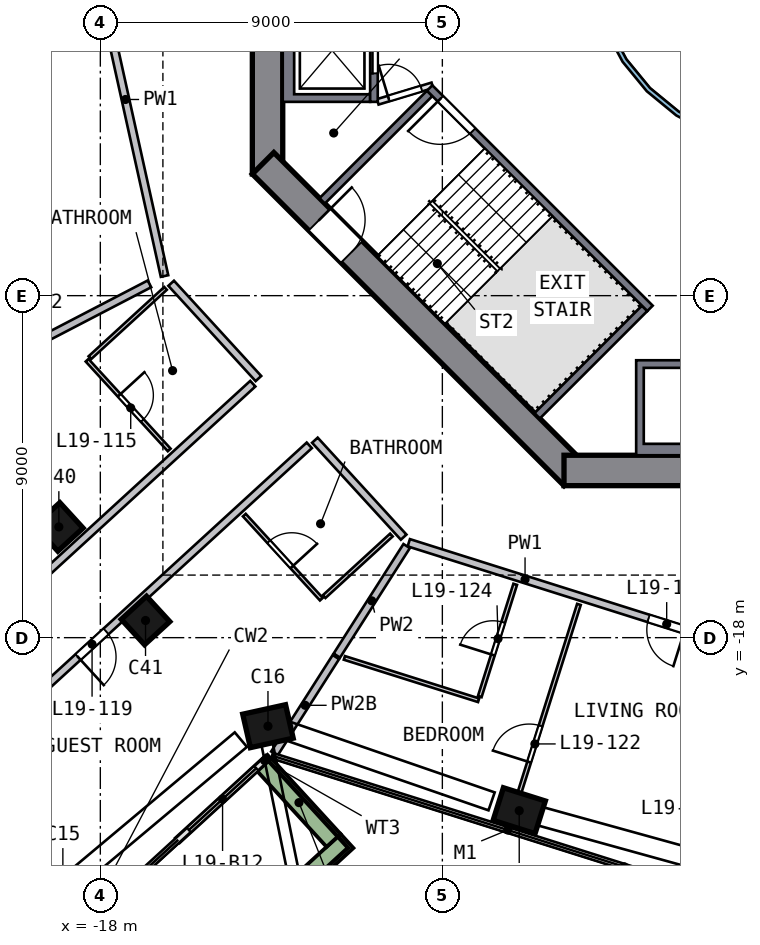
"""IFC4 building model, lengths in metres.
Left out: names, types, materials, properties, quantities, classifications, styles, units other than length and angle.
Written with IfcOpenShell. Run it as: python <this file> out.ifc"""

import sys

from ifc_helpers import new_model, si_unit, direction, frame, frame_2d, origin, origin_2d, place, context, subcontext, project, spatial, polyline, rectangle, outline, extrude, element, fill, save


model = new_model("IFC4")
c1 = context("Model", 3, precision=1e-05, world=origin(), true_north=direction((0.0, 1.0)))
c2 = subcontext(c1, "Body", "Model", "MODEL_VIEW")
j1 = project(units=[si_unit("LENGTHUNIT", "METRE"), si_unit("PLANEANGLEUNIT", "RADIAN")], contexts=[c1])
p1 = place(None, origin())
s1 = spatial("IfcSite", under=j1, at=p1, CompositionType="ELEMENT")
p2 = place(p1, origin())
s2 = spatial("IfcBuilding", under=s1, at=p2, CompositionType="ELEMENT")
p3 = place(p2, frame((0.0, 0.0, 86.0)))
s3 = spatial("IfcBuildingStorey", under=s2, at=p3, CompositionType="ELEMENT", Elevation=86.0)
p4 = place(p3, frame((-13.706, -20.252, 0.0), z_axis=(0.096843399, -0.064384897, 0.993214952), x_axis=(-0.971758684, -0.221869182, 0.080368695)))
e1 = element("IfcColumn", 1, at=p4, inside=s3, PredefinedType="COLUMN", context=c2, shape_type="SweptSolid", body=[
    extrude(rectangle(XDim=1.15, YDim=0.9, at=origin_2d()), origin(), (0.0, 0.0, 1.0), 3.212),
])
p5 = place(p3, frame((-7.107, -22.513, 0.0), z_axis=(0.107382919, -0.032929748, 0.99367225), x_axis=(0.947501295, -0.299377243, -0.11231457)))
e2 = element("IfcColumn", 2, at=p5, inside=s3, PredefinedType="COLUMN", context=c2, shape_type="SweptSolid", body=[
    extrude(rectangle(XDim=1.15, YDim=0.9, at=origin_2d()), origin(), (0.0, 0.0, 1.0), 3.21),
])
for number, where, z_axis, x_axis in (
    (3, (-19.178, -14.976, 0.0), (0.072, -0.091, 0.993), (-0.738, -0.674, -0.008)),
    (4, (-16.912, -17.452, 0.0), (0.084, -0.08, 0.993), (-0.737, -0.676, 0.008)),
):
    element("IfcColumn", number, at=place(p3, frame(where, z_axis=z_axis, x_axis=x_axis)), inside=s3, PredefinedType="COLUMN", context=c2, shape_type="SweptSolid", body=[
        extrude(rectangle(XDim=0.9, YDim=0.9, at=origin_2d()), origin(), (0.0, 0.0, 1.0), 3.211),
    ])
p6 = place(p3, frame((-13.6, 5.799, 0.0), z_axis=(0.0, 0.0, 1.0), x_axis=(0.0, -1.0, 0.0)))
e5 = element("IfcWall", 5, at=p6, inside=s3, PredefinedType="SHEAR", context=c2, shape_type="SweptSolid", body=[
    extrude(rectangle(XDim=11.598, YDim=0.8, at=frame_2d((5.799, 0.0))), origin(), (0.0, 0.0, 1.0), 3.5),
])
p7 = place(p6, frame((4.899, 0.0, 0.0)))
e6 = element("IfcOpeningElement", 6, at=p7, cuts=e5, PredefinedType="OPENING", context=c2, shape_type="SweptSolid", body=[
    extrude(rectangle(XDim=1.8, YDim=2.1, at=frame_2d((0.9, 1.05))), frame((0.0, 0.41, 0.0), z_axis=(0.0, -1.0, 0.0), x_axis=(1.0, 0.0, 0.0)), (0.0, 0.0, 1.0), 0.82),
])
p8 = place(p3, frame((-13.717, -5.516, 0.0), z_axis=(0.0, 0.0, 1.0), x_axis=(0.707106781, -0.707106781, 0.0)))
e7 = element("IfcWall", 7, at=p8, inside=s3, PredefinedType="SHEAR", context=c2, shape_type="SweptSolid", body=[
    extrude(rectangle(XDim=11.598, YDim=0.8, at=frame_2d((5.799, 0.0))), origin(), (0.0, 0.0, 1.0), 3.5),
])
p9 = place(p8, frame((2.099, 0.0, 0.0)))
e8 = element("IfcOpeningElement", 8, at=p9, cuts=e7, PredefinedType="OPENING", context=c2, shape_type="SweptSolid", body=[
    extrude(rectangle(XDim=1.2, YDim=2.1, at=frame_2d((0.6, 1.05))), frame((0.0, 0.41, 0.0), z_axis=(0.0, -1.0, 0.0), x_axis=(1.0, 0.0, 0.0)), (0.0, 0.0, 1.0), 0.82),
])
p10 = place(p3, frame((-5.799, -13.6, 0.0), z_axis=(0.0, 0.0, 1.0), x_axis=(1.0, 0.0, 0.0)))
e9 = element("IfcWall", 9, at=p10, inside=s3, PredefinedType="SHEAR", context=c2, shape_type="SweptSolid", body=[
    extrude(rectangle(XDim=11.598, YDim=0.8, at=frame_2d((5.799, 0.0))), origin(), (0.0, 0.0, 1.0), 3.5),
])
p11 = place(p10, frame((4.899, 0.0, 0.0)))
e10 = element("IfcOpeningElement", 10, at=p11, cuts=e9, PredefinedType="OPENING", context=c2, shape_type="SweptSolid", body=[
    extrude(rectangle(XDim=1.8, YDim=2.1, at=frame_2d((0.9, 1.05))), frame((0.0, 0.41, 0.0), z_axis=(0.0, -1.0, 0.0), x_axis=(1.0, 0.0, 0.0)), (0.0, 0.0, 1.0), 0.82),
])
p12 = place(p3, frame((-15.963, -23.329, 0.0), z_axis=(0.0, 0.0, 1.0), x_axis=(0.73747709, 0.67537215, 0.0)))
e11 = element("IfcWall", 11, at=p12, inside=s3, PredefinedType="SOLIDWALL", context=c2, shape_type="SweptSolid", body=[
    extrude(rectangle(XDim=3.2, YDim=0.15, at=frame_2d((1.6, 0.0))), origin(), (0.0, 0.0, 1.0), 2.425),
])
p13 = place(p12, frame((0.4, 0.0, 0.0)))
e12 = element("IfcOpeningElement", 12, at=p13, cuts=e11, PredefinedType="OPENING", context=c2, shape_type="SweptSolid", body=[
    extrude(rectangle(XDim=2.4, YDim=2.4, at=frame_2d((1.2, 1.2))), frame((0.0, 0.085, 0.0), z_axis=(0.0, -1.0, 0.0), x_axis=(1.0, 0.0, 0.0)), (0.0, 0.0, 1.0), 0.17),
])
p14 = place(p3, frame((-21.014, -32.056, 0.0), z_axis=(0.0, 0.0, 1.0), x_axis=(0.737507871, 0.675338537, 0.0)))
e13 = element("IfcWall", 13, at=p14, inside=s3, PredefinedType="SOLIDWALL", context=c2, shape_type="SweptSolid", body=[
    extrude(rectangle(XDim=12.888, YDim=0.5, at=frame_2d((6.444, 0.0))), origin(), (0.0, 0.0, 1.0), 0.7),
])
p15 = place(p3, frame((-11.862, -23.336, 0.0), z_axis=(0.0, 0.0, 1.0), x_axis=(-0.675351791, 0.737495734, 0.0)))
e14 = element("IfcWall", 14, at=p15, inside=s3, PredefinedType="SOLIDWALL", context=c2, shape_type="SweptSolid", body=[
    extrude(rectangle(XDim=2.699, YDim=0.5, at=frame_2d((1.35, 0.0))), origin(), (0.0, 0.0, 1.0), 0.7),
])
p16 = place(p3, origin())
e15 = element("IfcWall", 15, at=p16, inside=s3, PredefinedType="SOLIDWALL", context=c2, shape_type="SweptSolid", body=[
    extrude(outline(polyline([(-13.2, -3.9), (-13.2, -1.2), (-10.9, -1.2), (-10.9, -1.4), (-12.9, -1.4), (-12.9, -3.7), (-10.9, -3.7), (-10.9, -3.9), (-13.2, -3.9)])), origin(), (0.0, 0.0, 1.0), 3.19),
])
p17 = place(p3, frame((-10.8, -1.2, 0.0), z_axis=(0.0, 0.0, 1.0), x_axis=(0.0, -1.0, 0.0)))
e16 = element("IfcWall", 16, at=p17, inside=s3, PredefinedType="SOLIDWALL", context=c2, shape_type="SweptSolid", body=[
    extrude(rectangle(XDim=2.7, YDim=0.2, at=frame_2d((1.35, 0.0))), origin(), (0.0, 0.0, 1.0), 3.19),
])
p18 = place(p17, frame((0.75, 0.0, 0.0)))
e17 = element("IfcOpeningElement", 17, at=p18, cuts=e16, PredefinedType="OPENING", context=c2, shape_type="SweptSolid", body=[
    extrude(rectangle(XDim=1.2, YDim=2.1, at=frame_2d((0.6, 1.05))), frame((0.0, 0.11, 0.0), z_axis=(0.0, -1.0, 0.0), x_axis=(1.0, 0.0, 0.0)), (0.0, 0.0, 1.0), 0.22),
])
p19 = place(p3, origin())
e18 = element("IfcWall", 18, at=p19, inside=s3, PredefinedType="SOLIDWALL", context=c2, shape_type="SweptSolid", body=[
    extrude(outline(polyline([(-1.2, -13.2), (-3.9, -13.2), (-3.9, -10.7), (-1.2, -10.7), (-1.2, -13.2)]), holes=[polyline([(-3.7, -10.9), (-3.7, -12.9), (-1.4, -12.9), (-1.4, -10.9), (-3.7, -10.9)])]), origin(), (0.0, 0.0, 1.0), 3.19),
])
p20 = place(p3, frame((-3.535, -9.334, 0.0), z_axis=(0.0, 0.0, 1.0), x_axis=(-0.707106781, 0.707106781, 0.0)))
e19 = element("IfcWall", 19, at=p20, inside=s3, PredefinedType="SOLIDWALL", context=c2, shape_type="SweptSolid", body=[
    extrude(rectangle(XDim=8.2, YDim=0.2, at=frame_2d((4.1, 0.0))), origin(), (0.0, 0.0, 1.0), 3.19),
])
p21 = place(p20, frame((6.6, 0.0, 0.0)))
e20 = element("IfcOpeningElement", 20, at=p21, cuts=e19, PredefinedType="OPENING", context=c2, shape_type="SweptSolid", body=[
    extrude(rectangle(XDim=1.2, YDim=2.1, at=frame_2d((0.6, 1.05))), frame((0.0, 0.11, 0.0), z_axis=(0.0, -1.0, 0.0), x_axis=(1.0, 0.0, 0.0)), (0.0, 0.0, 1.0), 0.22),
])
for number, where, z_axis, x_axis in (
    (21, (-9.334, -3.677, 0.0), (0.0, 0.0, 1.0), (-0.707, -0.707, 0.0)),
    (22, (-3.677, -9.334, 0.0), (0.0, 0.0, 1.0), (-0.707, -0.707, 0.0)),
):
    element("IfcWall", number, at=place(p3, frame(where, z_axis=z_axis, x_axis=x_axis)), inside=s3, PredefinedType="SOLIDWALL", context=c2, shape_type="SweptSolid", body=[
        extrude(rectangle(XDim=4.0, YDim=0.2, at=frame_2d((2.0, 0.0))), origin(), (0.0, 0.0, 1.0), 3.19),
    ])
p22 = place(p3, frame((-10.7, -3.9, 0.0), z_axis=(0.0, 0.0, 1.0), x_axis=(0.957084567, 0.289808785, 0.0)))
e23 = element("IfcWall", 23, at=p22, inside=s3, PredefinedType="PARTITIONING", context=c2, shape_type="SweptSolid", body=[
    extrude(rectangle(XDim=1.501, YDim=0.15, at=frame_2d((0.75, 0.0))), origin(), (0.0, 0.0, 1.0), 3.19),
])
p23 = place(p22, frame((0.301, 0.0, 0.0)))
e24 = element("IfcOpeningElement", 24, at=p23, cuts=e23, PredefinedType="OPENING", context=c2, shape_type="SweptSolid", body=[
    extrude(rectangle(XDim=0.9, YDim=2.1, at=frame_2d((0.45, 1.05))), frame((0.0, 0.085, 0.0), z_axis=(0.0, -1.0, 0.0), x_axis=(1.0, 0.0, 0.0)), (0.0, 0.0, 1.0), 0.17),
])
p24 = place(p3, origin())
e25 = element("IfcWall", 25, at=p24, inside=s3, PredefinedType="SOLIDWALL", context=c2, shape_type="SweptSolid", body=[
    extrude(outline(polyline([(5.021, -0.999), (4.73, -1.959), (4.257, -2.844), (3.62, -3.62), (2.844, -4.257), (1.959, -4.73), (0.999, -5.021), (0.0, -5.12), (-0.999, -5.021), (-1.959, -4.73), (-2.844, -4.257), (-3.62, -3.62), (-4.257, -2.844), (-4.73, -1.959), (-5.021, -0.999), (-5.12, 0.0), (-5.021, 0.999), (-4.73, 1.959), (-4.257, 2.844), (-3.62, 3.62), (-2.844, 4.257), (-1.959, 4.73), (-0.999, 5.021), (0.0, 5.12), (0.999, 5.021), (1.959, 4.73), (2.844, 4.257), (3.62, 3.62), (4.257, 2.844), (4.73, 1.959), (5.021, 0.999), (5.12, 0.0), (5.021, -0.999)]), holes=[polyline([(4.904, 0.976), (4.619, 1.913), (4.157, 2.778), (3.535, 3.535), (2.778, 4.157), (1.913, 4.619), (0.976, 4.904), (0.0, 5.0), (-0.976, 4.904), (-1.913, 4.619), (-2.778, 4.157), (-3.535, 3.535), (-4.157, 2.778), (-4.619, 1.913), (-4.904, 0.976), (-5.0, 0.0), (-4.904, -0.976), (-4.619, -1.913), (-4.157, -2.778), (-3.535, -3.535), (-2.778, -4.157), (-1.913, -4.619), (-0.976, -4.904), (0.0, -5.0), (0.976, -4.904), (1.913, -4.619), (2.778, -4.157), (3.535, -3.535), (4.157, -2.778), (4.619, -1.913), (4.904, -0.976), (5.0, 0.0), (4.904, 0.976)])]), origin(), (0.0, 0.0, 1.0), 3.19),
])
p25 = place(p3, frame((-28.508, -24.613, 0.0), z_axis=(0.0, 0.0, 1.0), x_axis=(0.737515881, 0.67532979, 0.0)))
e26 = element("IfcWall", 26, at=p25, inside=s3, PredefinedType="SOLIDWALL", context=c2, shape_type="SweptSolid", body=[
    extrude(rectangle(XDim=19.689, YDim=0.2, at=frame_2d((9.844, 0.0))), origin(), (0.0, 0.0, 1.0), 3.19),
])
p26 = place(p25, frame((2.85, 0.0, 0.0)))
e27 = element("IfcOpeningElement", 27, at=p26, cuts=e26, PredefinedType="OPENING", context=c2, shape_type="SweptSolid", body=[
    extrude(rectangle(XDim=1.0, YDim=2.1, at=frame_2d((0.5, 1.05))), frame((0.0, 0.11, 0.0), z_axis=(0.0, -1.0, 0.0), x_axis=(1.0, 0.0, 0.0)), (0.0, 0.0, 1.0), 0.22),
])
p27 = place(p3, frame((-12.502, -12.939, 0.0), z_axis=(0.0, 0.0, 1.0), x_axis=(-0.737510226, -0.675335966, 0.0)))
e28 = element("IfcWall", 28, at=p27, inside=s3, PredefinedType="SOLIDWALL", context=c2, shape_type="SweptSolid", body=[
    extrude(rectangle(XDim=19.688, YDim=0.2, at=frame_2d((9.844, 0.0))), origin(), (0.0, 0.0, 1.0), 3.19),
])
p28 = place(p27, frame((7.25, 0.0, 0.0)))
e29 = element("IfcOpeningElement", 29, at=p28, cuts=e28, PredefinedType="OPENING", context=c2, shape_type="SweptSolid", body=[
    extrude(rectangle(XDim=1.0, YDim=2.1, at=frame_2d((0.5, 1.05))), frame((0.0, 0.11, 0.0), z_axis=(0.0, -1.0, 0.0), x_axis=(1.0, 0.0, 0.0)), (0.0, 0.0, 1.0), 0.22),
])
p29 = place(p3, frame((-18.367, 0.808, 0.0), z_axis=(0.0, 0.0, 1.0), x_axis=(0.216096423, -0.976372027, 0.0)))
e30 = element("IfcWall", 30, at=p29, inside=s3, PredefinedType="SOLIDWALL", context=c2, shape_type="SweptSolid", body=[
    extrude(rectangle(XDim=9.516, YDim=0.2, at=frame_2d((4.758, 0.0))), origin(), (0.0, 0.0, 1.0), 3.19),
])
p30 = place(p3, frame((-16.136, -8.674, 0.0), z_axis=(0.0, 0.0, 1.0), x_axis=(0.675366857, -0.737481938, 0.0)))
e31 = element("IfcWall", 31, at=p30, inside=s3, PredefinedType="SOLIDWALL", context=c2, shape_type="SweptSolid", body=[
    extrude(rectangle(XDim=3.4, YDim=0.2, at=frame_2d((1.7, 0.0))), origin(), (0.0, 0.0, 1.0), 3.19),
])
p31 = place(p3, frame((-12.354, -12.804, 0.0), z_axis=(0.0, 0.0, 1.0), x_axis=(0.675324927, -0.737520334, 0.0)))
e32 = element("IfcWall", 32, at=p31, inside=s3, PredefinedType="SOLIDWALL", context=c2, shape_type="SweptSolid", body=[
    extrude(rectangle(XDim=3.458, YDim=0.2, at=frame_2d((1.729, 0.0))), origin(), (0.0, 0.0, 1.0), 3.19),
])
p32 = place(p3, frame((-0.808, -18.367, 0.0), z_axis=(0.0, 0.0, 1.0), x_axis=(-0.953616003, 0.301025777, 0.0)))
e33 = element("IfcWall", 33, at=p32, inside=s3, PredefinedType="SOLIDWALL", context=c2, shape_type="SweptSolid", body=[
    extrude(rectangle(XDim=9.517, YDim=0.2, at=frame_2d((4.758, 0.0))), origin(), (0.0, 0.0, 1.0), 3.19),
])
p33 = place(p32, frame((1.9, 0.0, 0.0)))
e34 = element("IfcOpeningElement", 34, at=p33, cuts=e33, PredefinedType="OPENING", context=c2, shape_type="SweptSolid", body=[
    extrude(rectangle(XDim=1.0, YDim=2.1, at=frame_2d((0.5, 1.05))), frame((0.0, 0.11, 0.0), z_axis=(0.0, -1.0, 0.0), x_axis=(1.0, 0.0, 0.0)), (0.0, 0.0, 1.0), 0.22),
])
p34 = place(p3, frame((-16.707, -8.69, 0.0), z_axis=(0.0, 0.0, 1.0), x_axis=(-0.887170515, -0.461441739, 0.0)))
e35 = element("IfcWall", 35, at=p34, inside=s3, PredefinedType="SOLIDWALL", context=c2, shape_type="SweptSolid", body=[
    extrude(rectangle(XDim=6.132, YDim=0.2, at=frame_2d((3.066, 0.0))), origin(), (0.0, 0.0, 1.0), 3.19),
])
p35 = place(p3, frame((-11.802, -18.51, 0.0), z_axis=(0.0, 0.0, 1.0), x_axis=(-0.537578234, -0.843213877, 0.0)))
e36 = element("IfcWall", 36, at=p35, inside=s3, PredefinedType="SOLIDWALL", context=c2, shape_type="SweptSolid", body=[
    extrude(rectangle(XDim=3.011, YDim=0.2, at=frame_2d((1.506, 0.0))), origin(), (0.0, 0.0, 1.0), 2.69),
])
p36 = place(p3, frame((-9.939, -15.589, 0.0), z_axis=(0.0, 0.0, 1.0), x_axis=(-0.537591617, -0.843205345, 0.0)))
e37 = element("IfcWall", 37, at=p36, inside=s3, PredefinedType="SOLIDWALL", context=c2, shape_type="SweptSolid", body=[
    extrude(rectangle(XDim=3.418, YDim=0.2, at=frame_2d((1.709, 0.0))), origin(), (0.0, 0.0, 1.0), 3.19),
])
p37 = place(p3, frame((-16.283, -8.809, 0.0), z_axis=(0.0, 0.0, 1.0), x_axis=(-0.737570623, -0.675270003, 0.0)))
e38 = element("IfcWall", 38, at=p37, inside=s3, PredefinedType="PARTITIONING", context=c2, shape_type="SweptSolid", body=[
    extrude(rectangle(XDim=2.7, YDim=0.1, at=frame_2d((1.35, 0.0))), origin(), (0.0, 0.0, 1.0), 3.19),
])
p38 = place(p3, frame((-18.348, -10.7, 0.0), z_axis=(0.0, 0.0, 1.0), x_axis=(0.67529265, -0.737549887, 0.0)))
e39 = element("IfcWall", 39, at=p38, inside=s3, PredefinedType="PARTITIONING", context=c2, shape_type="SweptSolid", body=[
    extrude(rectangle(XDim=3.2, YDim=0.1, at=frame_2d((1.6, 0.0))), origin(), (0.0, 0.0, 1.0), 3.19),
])
p39 = place(p38, frame((1.25, 0.0, 0.0)))
e40 = element("IfcOpeningElement", 40, at=p39, cuts=e39, PredefinedType="OPENING", context=c2, shape_type="SweptSolid", body=[
    extrude(rectangle(XDim=0.9, YDim=2.1, at=frame_2d((0.45, 1.05))), frame((0.0, 0.06, 0.0), z_axis=(0.0, -1.0, 0.0), x_axis=(1.0, 0.0, 0.0)), (0.0, 0.0, 1.0), 0.12),
])
p40 = place(p3, frame((-14.21, -14.775, 0.0), z_axis=(0.0, 0.0, 1.0), x_axis=(0.675337617, -0.737508714, 0.0)))
e41 = element("IfcWall", 41, at=p40, inside=s3, PredefinedType="PARTITIONING", context=c2, shape_type="SweptSolid", body=[
    extrude(rectangle(XDim=3.0, YDim=0.1, at=frame_2d((1.5, 0.0))), origin(), (0.0, 0.0, 1.0), 3.19),
])
p41 = place(p40, frame((0.95, 0.0, 0.0)))
e42 = element("IfcOpeningElement", 42, at=p41, cuts=e41, PredefinedType="OPENING", context=c2, shape_type="SweptSolid", body=[
    extrude(rectangle(XDim=0.9, YDim=2.1, at=frame_2d((0.45, 1.05))), frame((0.0, 0.06, 0.0), z_axis=(0.0, -1.0, 0.0), x_axis=(1.0, 0.0, 0.0)), (0.0, 0.0, 1.0), 0.12),
])
p42 = place(p3, frame((-10.341, -15.299, 0.0), z_axis=(0.0, 0.0, 1.0), x_axis=(-0.737550957, -0.675291483, 0.0)))
e43 = element("IfcWall", 43, at=p42, inside=s3, PredefinedType="PARTITIONING", context=c2, shape_type="SweptSolid", body=[
    extrude(rectangle(XDim=2.4, YDim=0.1, at=frame_2d((1.2, 0.0))), origin(), (0.0, 0.0, 1.0), 3.19),
])
p43 = place(p3, frame((-11.578, -18.532, 0.0), z_axis=(0.0, 0.0, 1.0), x_axis=(0.953617524, -0.301020959, 0.0)))
e44 = element("IfcWall", 44, at=p43, inside=s3, PredefinedType="PARTITIONING", context=c2, shape_type="SweptSolid", body=[
    extrude(rectangle(XDim=3.704, YDim=0.1, at=frame_2d((1.852, 0.0))), origin(), (0.0, 0.0, 1.0), 3.19),
])
p44 = place(p3, frame((-8.016, -19.552, 0.0), z_axis=(0.0, 0.0, 1.0), x_axis=(0.301018286, 0.953618368, 0.0)))
e45 = element("IfcWall", 45, at=p44, inside=s3, PredefinedType="PARTITIONING", context=c2, shape_type="SweptSolid", body=[
    extrude(rectangle(XDim=3.1, YDim=0.1, at=frame_2d((1.55, 0.0))), origin(), (0.0, 0.0, 1.0), 3.19),
])
p45 = place(p44, frame((1.15, 0.0, 0.0)))
e46 = element("IfcOpeningElement", 46, at=p45, cuts=e45, PredefinedType="OPENING", context=c2, shape_type="SweptSolid", body=[
    extrude(rectangle(XDim=0.9, YDim=2.1, at=frame_2d((0.45, 1.05))), frame((0.0, 0.06, 0.0), z_axis=(0.0, -1.0, 0.0), x_axis=(1.0, 0.0, 0.0)), (0.0, 0.0, 1.0), 0.12),
])
p46 = place(p3, frame((-7.258, -22.99, 0.0), z_axis=(0.0, 0.0, 1.0), x_axis=(0.301026872, 0.953615657, 0.0)))
e47 = element("IfcWall", 47, at=p46, inside=s3, PredefinedType="PARTITIONING", context=c2, shape_type="SweptSolid", body=[
    extrude(rectangle(XDim=6.15, YDim=0.1, at=frame_2d((3.075, 0.0))), origin(), (0.0, 0.0, 1.0), 3.19),
])
p47 = place(p46, frame((1.8, 0.0, 0.0)))
e48 = element("IfcOpeningElement", 48, at=p47, cuts=e47, PredefinedType="OPENING", context=c2, shape_type="SweptSolid", body=[
    extrude(rectangle(XDim=1.0, YDim=2.1, at=frame_2d((0.5, 1.05))), frame((0.0, 0.06, 0.0), z_axis=(0.0, -1.0, 0.0), x_axis=(1.0, 0.0, 0.0)), (0.0, 0.0, 1.0), 0.12),
])
p48 = place(p13, origin())
e49 = element("IfcDoor", 49, at=p48, inside=s3, OperationType="SLIDING_TO_RIGHT", PredefinedType="DOOR", context=c2, shape_type="SweptSolid", body=[
    extrude(rectangle(XDim=2.4, YDim=2.4, at=frame_2d((1.2, 1.2))), frame((0.0, 0.025, 0.0), z_axis=(0.0, -1.0, 0.0), x_axis=(1.0, 0.0, 0.0)), (0.0, 0.0, 1.0), 0.05),
])
fill(e12, e49)
p49 = place(p18, origin())
e50 = element("IfcDoor", 50, at=p49, inside=s3, OperationType="DOUBLE_DOOR_SLIDING", PredefinedType="DOOR", context=c2, shape_type="SweptSolid", body=[
    extrude(rectangle(XDim=1.2, YDim=2.1, at=frame_2d((0.6, 1.05))), frame((0.0, 0.025, 0.0), z_axis=(0.0, -1.0, 0.0), x_axis=(1.0, 0.0, 0.0)), (0.0, 0.0, 1.0), 0.05),
])
fill(e17, e50)
p50 = place(p21, origin())
e51 = element("IfcDoor", 51, at=p50, inside=s3, OperationType="SINGLE_SWING_RIGHT", PredefinedType="DOOR", context=c2, shape_type="SweptSolid", body=[
    extrude(rectangle(XDim=1.2, YDim=2.1, at=frame_2d((0.6, 1.05))), frame((0.0, 0.025, 0.0), z_axis=(0.0, -1.0, 0.0), x_axis=(1.0, 0.0, 0.0)), (0.0, 0.0, 1.0), 0.05),
])
fill(e20, e51)
p51 = place(p9, origin())
e52 = element("IfcDoor", 52, at=p51, inside=s3, OperationType="SINGLE_SWING_LEFT", PredefinedType="DOOR", context=c2, shape_type="SweptSolid", body=[
    extrude(rectangle(XDim=1.2, YDim=2.1, at=frame_2d((0.6, 1.05))), frame((0.0, 0.025, 0.0), z_axis=(0.0, -1.0, 0.0), x_axis=(1.0, 0.0, 0.0)), (0.0, 0.0, 1.0), 0.05),
])
fill(e8, e52)
p52 = place(p23, origin())
e53 = element("IfcDoor", 53, at=p52, inside=s3, OperationType="SINGLE_SWING_LEFT", PredefinedType="DOOR", context=c2, shape_type="SweptSolid", body=[
    extrude(rectangle(XDim=0.9, YDim=2.1, at=frame_2d((0.45, 1.05))), frame((0.0, 0.025, 0.0), z_axis=(0.0, -1.0, 0.0), x_axis=(1.0, 0.0, 0.0)), (0.0, 0.0, 1.0), 0.05),
])
fill(e24, e53)
p53 = place(p39, origin())
e54 = element("IfcDoor", 54, at=p53, inside=s3, OperationType="SINGLE_SWING_LEFT", PredefinedType="DOOR", context=c2, shape_type="SweptSolid", body=[
    extrude(rectangle(XDim=0.9, YDim=2.1, at=frame_2d((0.45, 1.05))), frame((0.0, 0.025, 0.0), z_axis=(0.0, -1.0, 0.0), x_axis=(1.0, 0.0, 0.0)), (0.0, 0.0, 1.0), 0.05),
])
fill(e40, e54)
p54 = place(p28, origin())
e55 = element("IfcDoor", 55, at=p54, inside=s3, OperationType="SINGLE_SWING_RIGHT", PredefinedType="DOOR", context=c2, shape_type="SweptSolid", body=[
    extrude(rectangle(XDim=1.0, YDim=2.1, at=frame_2d((0.5, 1.05))), frame((0.0, 0.025, 0.0), z_axis=(0.0, -1.0, 0.0), x_axis=(1.0, 0.0, 0.0)), (0.0, 0.0, 1.0), 0.05),
])
fill(e29, e55)
p55 = place(p41, origin())
e56 = element("IfcDoor", 56, at=p55, inside=s3, OperationType="SINGLE_SWING_RIGHT", PredefinedType="DOOR", context=c2, shape_type="SweptSolid", body=[
    extrude(rectangle(XDim=0.9, YDim=2.1, at=frame_2d((0.45, 1.05))), frame((0.0, 0.025, 0.0), z_axis=(0.0, -1.0, 0.0), x_axis=(1.0, 0.0, 0.0)), (0.0, 0.0, 1.0), 0.05),
])
fill(e42, e56)
p56 = place(p33, origin())
e57 = element("IfcDoor", 57, at=p56, inside=s3, OperationType="SINGLE_SWING_LEFT", PredefinedType="DOOR", context=c2, shape_type="SweptSolid", body=[
    extrude(rectangle(XDim=1.0, YDim=2.1, at=frame_2d((0.5, 1.05))), frame((0.0, 0.025, 0.0), z_axis=(0.0, -1.0, 0.0), x_axis=(1.0, 0.0, 0.0)), (0.0, 0.0, 1.0), 0.05),
])
fill(e34, e57)
p57 = place(p47, origin())
e58 = element("IfcDoor", 58, at=p57, inside=s3, OperationType="SINGLE_SWING_LEFT", PredefinedType="DOOR", context=c2, shape_type="SweptSolid", body=[
    extrude(rectangle(XDim=1.0, YDim=2.1, at=frame_2d((0.5, 1.05))), frame((0.0, 0.025, 0.0), z_axis=(0.0, -1.0, 0.0), x_axis=(1.0, 0.0, 0.0)), (0.0, 0.0, 1.0), 0.05),
])
fill(e48, e58)
p58 = place(p45, origin())
e59 = element("IfcDoor", 59, at=p58, inside=s3, OperationType="SINGLE_SWING_LEFT", PredefinedType="DOOR", context=c2, shape_type="SweptSolid", body=[
    extrude(rectangle(XDim=0.9, YDim=2.1, at=frame_2d((0.45, 1.05))), frame((0.0, 0.025, 0.0), z_axis=(0.0, -1.0, 0.0), x_axis=(1.0, 0.0, 0.0)), (0.0, 0.0, 1.0), 0.05),
])
fill(e46, e59)
save(model, sys.argv[1])
